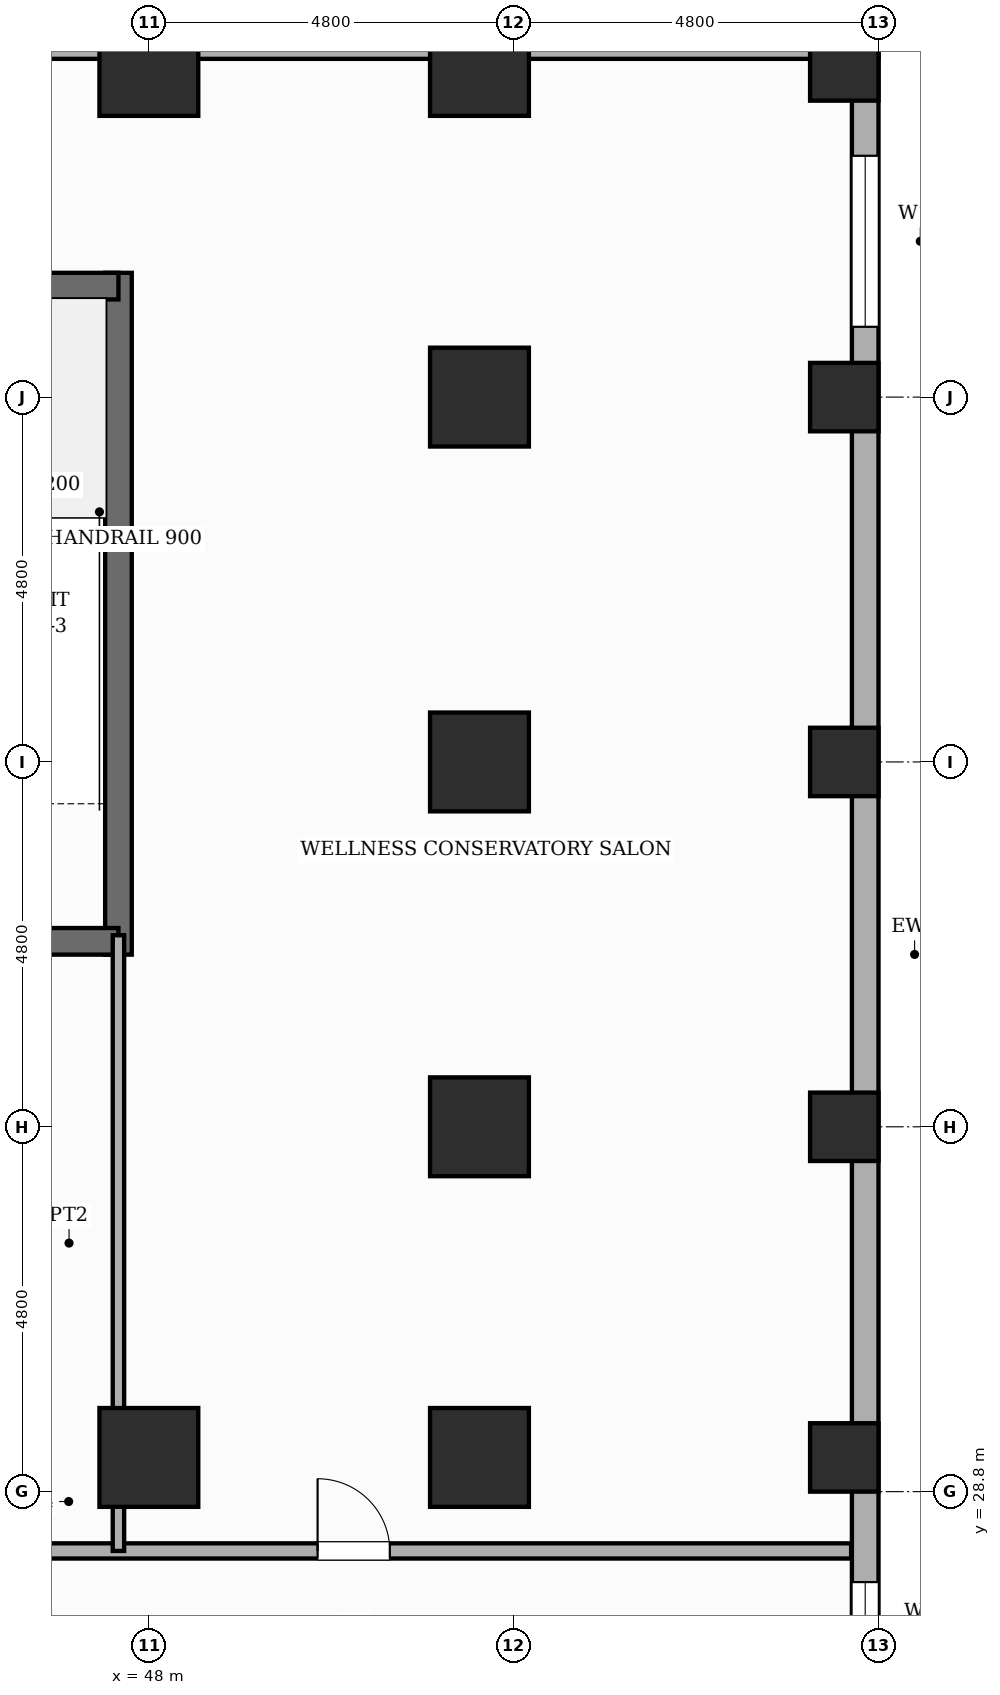
"""IFC4 building model, lengths in metres.
Left out: names, types, materials, properties, quantities, classifications, styles, units other than length and angle.
Written with IfcOpenShell. Run it as: python <this file> out.ifc"""

import sys

from ifc_helpers import new_model, si_unit, direction, frame, frame_2d, origin, origin_2d, place, context, subcontext, project, spatial, rectangle, circle, extrude, element, fill, save


model = new_model("IFC4")
c1 = context("Model", 3, precision=1e-05, world=origin(), true_north=direction((0.0, 1.0)))
c2 = subcontext(c1, "Body", "Model", "MODEL_VIEW")
j1 = project(units=[si_unit("LENGTHUNIT", "METRE"), si_unit("PLANEANGLEUNIT", "RADIAN")], contexts=[c1])
p1 = place(None, origin())
s1 = spatial("IfcSite", under=j1, at=p1, CompositionType="ELEMENT")
p2 = place(p1, origin())
s2 = spatial("IfcBuilding", under=s1, at=p2, CompositionType="ELEMENT")
p3 = place(p2, frame((0.0, 0.0, 19.6)))
s3 = spatial("IfcBuildingStorey", under=s2, at=p3, CompositionType="ELEMENT", Elevation=19.6)
p4 = place(p3, frame((47.6, 35.865, 0.0), z_axis=(0.0, 0.0, 1.0), x_axis=(0.0, 1.0, 0.0)))
e1 = element("IfcWall", 1, at=p4, inside=s3, PredefinedType="SHEAR", context=c2, shape_type="SweptSolid", body=[
    extrude(rectangle(XDim=8.97, YDim=0.35, at=frame_2d((4.485, 0.0))), origin(), (0.0, 0.0, 1.0), 5.4),
])
for number, where, z_axis, x_axis in (
    (2, (44.02, 36.04, 0.0), (0.0, 0.0, 1.0), (1.0, 0.0, 0.0)),
    (3, (44.02, 44.66, 0.0), (0.0, 0.0, 1.0), (1.0, 0.0, 0.0)),
):
    element("IfcWall", number, at=place(p3, frame(where, z_axis=z_axis, x_axis=x_axis)), inside=s3, PredefinedType="SHEAR", context=c2, shape_type="SweptSolid", body=[
        extrude(rectangle(XDim=3.58, YDim=0.35, at=frame_2d((1.79, 0.0))), origin(), (0.0, 0.0, 1.0), 5.4),
    ])
for number, where, z_axis, x_axis in (
    (4, (48.0, 29.25, 0.0), (0.0, 0.0, 1.0), (1.0, 0.0, 0.0)),
    (5, (48.0, 47.55, 0.0), (0.0, 0.0, 1.0), (1.0, 0.0, 0.0)),
    (6, (52.35, 29.25, 0.0), (0.0, 0.0, 1.0), (1.0, 0.0, 0.0)),
    (7, (52.35, 33.6, 0.0), (0.0, 0.0, 1.0), (1.0, 0.0, 0.0)),
    (8, (52.35, 38.4, 0.0), (0.0, 0.0, 1.0), (1.0, 0.0, 0.0)),
    (9, (52.35, 43.2, 0.0), (0.0, 0.0, 1.0), (1.0, 0.0, 0.0)),
    (10, (52.35, 47.55, 0.0), (0.0, 0.0, 1.0), (1.0, 0.0, 0.0)),
):
    element("IfcColumn", number, at=place(p3, frame(where, z_axis=z_axis, x_axis=x_axis)), inside=s3, PredefinedType="COLUMN", context=c2, shape_type="SweptSolid", body=[
        extrude(rectangle(XDim=1.3, YDim=1.3, at=origin_2d()), origin(), (0.0, 0.0, 1.0), 5.4),
    ])
for number, where, z_axis, x_axis in (
    (11, (57.15, 29.25, 0.0), (0.0, 0.0, 1.0), (1.0, 0.0, 0.0)),
    (12, (57.15, 33.6, 0.0), (0.0, 0.0, 1.0), (1.0, 0.0, 0.0)),
    (13, (57.15, 38.4, 0.0), (0.0, 0.0, 1.0), (1.0, 0.0, 0.0)),
    (14, (57.15, 43.2, 0.0), (0.0, 0.0, 1.0), (1.0, 0.0, 0.0)),
    (15, (57.15, 47.55, 0.0), (0.0, 0.0, 1.0), (1.0, 0.0, 0.0)),
):
    element("IfcColumn", number, at=place(p3, frame(where, z_axis=z_axis, x_axis=x_axis)), inside=s3, PredefinedType="COLUMN", context=c2, shape_type="SweptSolid", body=[
        extrude(circle(Radius=0.45, at=origin_2d()), origin(), (0.0, 0.0, 1.0), 5.4),
    ])
p5 = place(p3, frame((0.0, 47.825, 0.0), z_axis=(0.0, 0.0, 1.0), x_axis=(1.0, 0.0, 0.0)))
e16 = element("IfcWall", 16, at=p5, inside=s3, PredefinedType="STANDARD", context=c2, shape_type="SweptSolid", body=[
    extrude(rectangle(XDim=57.6, YDim=0.35, at=frame_2d((28.8, 0.0))), origin(), (0.0, 0.0, 1.0), 4.23),
])
p6 = place(p3, frame((57.425, 48.0, 0.0), z_axis=(0.0, 0.0, 1.0), x_axis=(0.0, -1.0, 0.0)))
e17 = element("IfcWall", 17, at=p6, inside=s3, PredefinedType="STANDARD", context=c2, shape_type="SweptSolid", body=[
    extrude(rectangle(XDim=38.4, YDim=0.35, at=frame_2d((19.2, 0.0))), origin(), (0.0, 0.0, 1.0), 4.23),
])
p7 = place(p6, frame((20.39, 0.0, 0.85)))
e18 = element("IfcOpeningElement", 18, at=p7, cuts=e17, PredefinedType="OPENING", context=c2, shape_type="SweptSolid", body=[
    extrude(rectangle(XDim=1.5, YDim=2.1, at=frame_2d((0.75, 1.05))), frame((0.0, 0.185, 0.0), z_axis=(0.0, -1.0, 0.0), x_axis=(1.0, 0.0, 0.0)), (0.0, 0.0, 1.0), 0.37),
])
p8 = place(p6, frame((1.625, 0.0, 0.85)))
e19 = element("IfcOpeningElement", 19, at=p8, cuts=e17, PredefinedType="OPENING", context=c2, shape_type="SweptSolid", body=[
    extrude(rectangle(XDim=2.25, YDim=2.85, at=frame_2d((1.125, 1.425))), frame((0.0, 0.185, 0.0), z_axis=(0.0, -1.0, 0.0), x_axis=(1.0, 0.0, 0.0)), (0.0, 0.0, 1.0), 0.37),
])
p9 = place(p6, frame((24.21, 0.0, 0.85)))
e20 = element("IfcOpeningElement", 20, at=p9, cuts=e17, PredefinedType="OPENING", context=c2, shape_type="SweptSolid", body=[
    extrude(rectangle(XDim=2.25, YDim=2.85, at=frame_2d((1.125, 1.425))), frame((0.0, 0.185, 0.0), z_axis=(0.0, -1.0, 0.0), x_axis=(1.0, 0.0, 0.0)), (0.0, 0.0, 1.0), 0.37),
])
p10 = place(p3, frame((44.02, 28.02, 0.0), z_axis=(0.0, 0.0, 1.0), x_axis=(1.0, 0.0, 0.0)))
e21 = element("IfcWall", 21, at=p10, inside=s3, PredefinedType="PARTITIONING", context=c2, shape_type="SweptSolid", body=[
    extrude(rectangle(XDim=13.22, YDim=0.2, at=frame_2d((6.61, 0.0))), origin(), (0.0, 0.0, 1.0), 5.15),
])
p11 = place(p10, frame((6.2, 0.0, 0.0)))
e22 = element("IfcOpeningElement", 22, at=p11, cuts=e21, PredefinedType="OPENING", context=c2, shape_type="SweptSolid", body=[
    extrude(rectangle(XDim=0.95, YDim=2.15, at=frame_2d((0.475, 1.075))), frame((0.0, 0.11, 0.0), z_axis=(0.0, -1.0, 0.0), x_axis=(1.0, 0.0, 0.0)), (0.0, 0.0, 1.0), 0.22),
])
p12 = place(p3, frame((47.6, 28.02, 0.0), z_axis=(0.0, 0.0, 1.0), x_axis=(0.0, 1.0, 0.0)))
e23 = element("IfcWall", 23, at=p12, inside=s3, PredefinedType="PARTITIONING", context=c2, shape_type="SweptSolid", body=[
    extrude(rectangle(XDim=8.1, YDim=0.15, at=frame_2d((4.05, 0.0))), origin(), (0.0, 0.0, 1.0), 5.15),
])
p13 = place(p7, origin())
e24 = element("IfcWindow", 24, at=p13, inside=s3, PartitioningType="SINGLE_PANEL", PredefinedType="WINDOW", context=c2, shape_type="SweptSolid", body=[
    extrude(rectangle(XDim=1.5, YDim=2.1, at=frame_2d((0.75, 1.05))), frame((0.0, 0.03, 0.0), z_axis=(0.0, -1.0, 0.0), x_axis=(1.0, 0.0, 0.0)), (0.0, 0.0, 1.0), 0.06),
])
fill(e18, e24)
p14 = place(p8, origin())
e25 = element("IfcWindow", 25, at=p14, inside=s3, PartitioningType="SINGLE_PANEL", PredefinedType="WINDOW", context=c2, shape_type="SweptSolid", body=[
    extrude(rectangle(XDim=2.25, YDim=2.85, at=frame_2d((1.125, 1.425))), frame((0.0, 0.03, 0.0), z_axis=(0.0, -1.0, 0.0), x_axis=(1.0, 0.0, 0.0)), (0.0, 0.0, 1.0), 0.06),
])
fill(e19, e25)
p15 = place(p11, origin())
e26 = element("IfcDoor", 26, at=p15, inside=s3, OperationType="SINGLE_SWING_LEFT", PredefinedType="DOOR", context=c2, shape_type="SweptSolid", body=[
    extrude(rectangle(XDim=0.95, YDim=2.15, at=frame_2d((0.475, 1.075))), frame((0.0, 0.025, 0.0), z_axis=(0.0, -1.0, 0.0), x_axis=(1.0, 0.0, 0.0)), (0.0, 0.0, 1.0), 0.05),
])
fill(e22, e26)
save(model, sys.argv[1])
